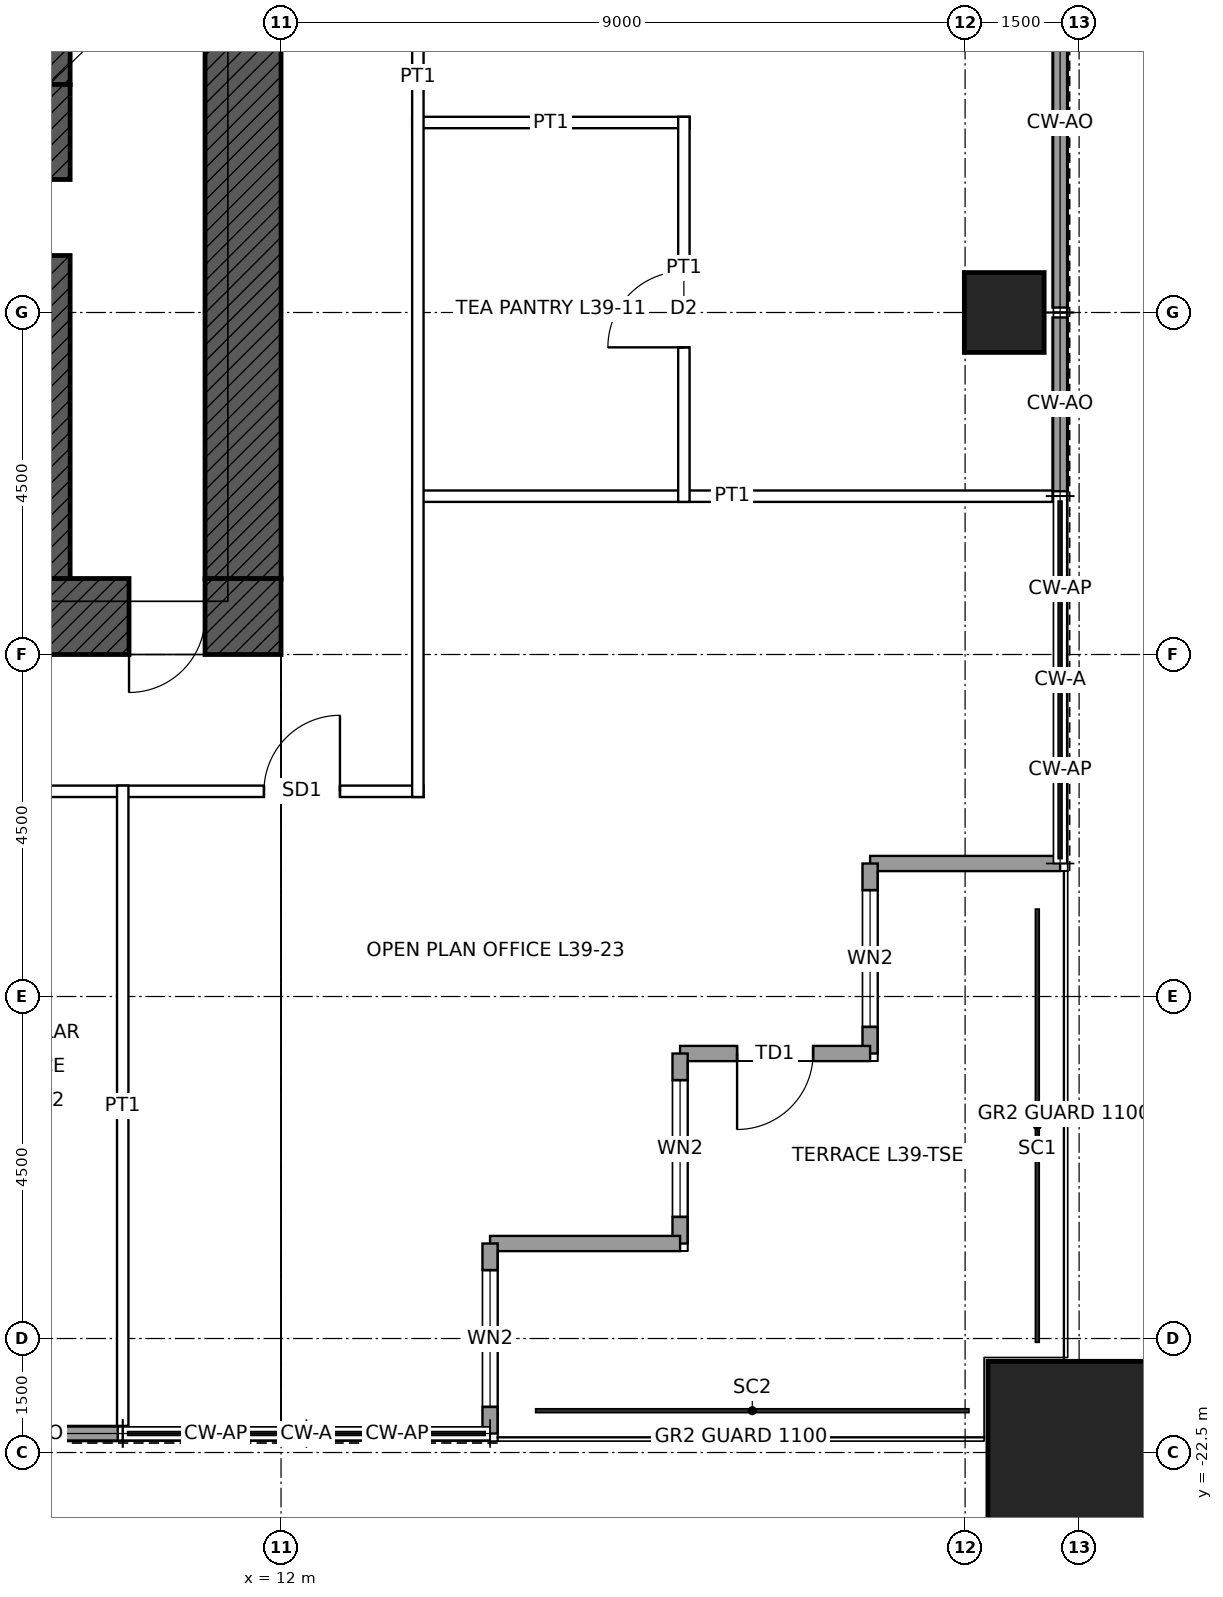
"""IFC4 building model, lengths in metres.
Left out: names, types, materials, properties, quantities, classifications, styles, units other than length and angle.
Written with IfcOpenShell. Run it as: python <this file> out.ifc"""

import sys

from ifc_helpers import new_model, si_unit, direction, frame, frame_2d, origin, origin_2d, place, context, subcontext, project, spatial, rectangle, hollow_rectangle, extrude, element, fill, save


model = new_model("IFC4")
c1 = context("Model", 3, precision=1e-05, world=origin(), true_north=direction((0.0, 1.0)))
c2 = subcontext(c1, "Body", "Model", "MODEL_VIEW")
j1 = project(units=[si_unit("LENGTHUNIT", "METRE"), si_unit("PLANEANGLEUNIT", "RADIAN")], contexts=[c1])
p1 = place(None, origin())
s1 = spatial("IfcSite", under=j1, at=p1, CompositionType="ELEMENT")
p2 = place(p1, origin())
s2 = spatial("IfcBuilding", under=s1, at=p2, CompositionType="ELEMENT")
p3 = place(p2, frame((0.0, 0.0, 189.9)))
s3 = spatial("IfcBuildingStorey", under=s2, at=p3, CompositionType="ELEMENT", Elevation=189.9)
p4 = place(p3, frame((22.5, -22.5, 0.0), z_axis=(0.0, 0.0, 1.0), x_axis=(1.0, 0.0, 0.0)))
e1 = element("IfcColumn", 1, at=p4, inside=s3, PredefinedType="COLUMN", context=c2, shape_type="SweptSolid", body=[
    extrude(hollow_rectangle(XDim=2.4, YDim=2.4, WallThickness=0.12, at=origin_2d()), origin(), (0.0, 0.0, 1.0), 4.0),
])
p5 = place(p3, frame((21.515, -7.5, 0.0), z_axis=(0.0, 0.0, 1.0), x_axis=(1.0, 0.0, 0.0)))
e2 = element("IfcColumn", 2, at=p5, inside=s3, PredefinedType="COLUMN", context=c2, shape_type="SweptSolid", body=[
    extrude(hollow_rectangle(XDim=1.05, YDim=1.05, WallThickness=0.07, at=origin_2d()), origin(), (0.0, 0.0, 1.0), 4.0),
])
p6 = place(p3, frame((12.0, -11.5, 0.0), z_axis=(0.0, 0.0, 1.0), x_axis=(-1.0, 0.0, 0.0)))
e3 = element("IfcWall", 3, at=p6, inside=s3, PredefinedType="SHEAR", context=c2, shape_type="SweptSolid", body=[
    extrude(rectangle(XDim=24.0, YDim=1.0, at=frame_2d((12.0, 0.0))), origin(), (0.0, 0.0, 1.0), 4.0),
])
p7 = place(p6, frame((11.5, 0.0, 0.0)))
e4 = element("IfcOpeningElement", 4, at=p7, cuts=e3, PredefinedType="OPENING", context=c2, shape_type="SweptSolid", body=[
    extrude(rectangle(XDim=1.0, YDim=2.1, at=frame_2d((0.5, 1.05))), frame((0.0, 0.51, 0.0), z_axis=(0.0, -1.0, 0.0), x_axis=(1.0, 0.0, 0.0)), (0.0, 0.0, 1.0), 1.02),
])
p8 = place(p6, frame((1.0, 0.0, 0.0)))
e5 = element("IfcOpeningElement", 5, at=p8, cuts=e3, PredefinedType="OPENING", context=c2, shape_type="SweptSolid", body=[
    extrude(rectangle(XDim=1.0, YDim=2.4, at=frame_2d((0.5, 1.2))), frame((0.0, 0.51, 0.0), z_axis=(0.0, -1.0, 0.0), x_axis=(1.0, 0.0, 0.0)), (0.0, 0.0, 1.0), 1.02),
])
p9 = place(p3, frame((11.5, 11.0, 0.0), z_axis=(0.0, 0.0, 1.0), x_axis=(0.0, -1.0, 0.0)))
e6 = element("IfcWall", 6, at=p9, inside=s3, PredefinedType="SHEAR", context=c2, shape_type="SweptSolid", body=[
    extrude(rectangle(XDim=22.0, YDim=1.0, at=frame_2d((11.0, 0.0))), origin(), (0.0, 0.0, 1.0), 4.0),
])
p10 = place(p9, frame((10.5, 0.0, 0.0)))
e7 = element("IfcOpeningElement", 7, at=p10, cuts=e6, PredefinedType="OPENING", context=c2, shape_type="SweptSolid", body=[
    extrude(rectangle(XDim=1.0, YDim=2.4, at=frame_2d((0.5, 1.2))), frame((0.0, 0.51, 0.0), z_axis=(0.0, -1.0, 0.0), x_axis=(1.0, 0.0, 0.0)), (0.0, 0.0, 1.0), 1.02),
])
p11 = place(p3, frame((-9.0, -4.5, 0.0), z_axis=(0.0, 0.0, 1.0), x_axis=(1.0, 0.0, 0.0)))
e8 = element("IfcWall", 8, at=p11, inside=s3, PredefinedType="SHEAR", context=c2, shape_type="SweptSolid", body=[
    extrude(rectangle(XDim=18.0, YDim=0.45, at=frame_2d((9.0, 0.0))), origin(), (0.0, 0.0, 1.0), 4.0),
])
p12 = place(p3, frame((9.0, -4.5, 0.0), z_axis=(0.0, 0.0, 1.0), x_axis=(0.0, 1.0, 0.0)))
e9 = element("IfcWall", 9, at=p12, inside=s3, PredefinedType="SHEAR", context=c2, shape_type="SweptSolid", body=[
    extrude(rectangle(XDim=3.0, YDim=0.45, at=frame_2d((1.5, 0.0))), origin(), (0.0, 0.0, 1.0), 4.0),
])
p13 = place(p3, frame((9.0, -11.0, 0.0), z_axis=(0.0, 0.0, 1.0), x_axis=(0.0, 1.0, 0.0)))
e10 = element("IfcWall", 10, at=p13, inside=s3, PredefinedType="SHEAR", context=c2, shape_type="SweptSolid", body=[
    extrude(rectangle(XDim=6.5, YDim=0.45, at=frame_2d((3.25, 0.0))), origin(), (0.0, 0.0, 1.0), 4.0),
])
p14 = place(p13, frame((4.25, 0.0, 0.0)))
e11 = element("IfcOpeningElement", 11, at=p14, cuts=e10, PredefinedType="OPENING", context=c2, shape_type="SweptSolid", body=[
    extrude(rectangle(XDim=1.0, YDim=2.1, at=frame_2d((0.5, 1.05))), frame((0.0, 0.235, 0.0), z_axis=(0.0, -1.0, 0.0), x_axis=(1.0, 0.0, 0.0)), (0.0, 0.0, 1.0), 0.47),
])
p15 = place(p3, frame((22.25, -14.75, 0.0), z_axis=(0.0, 0.0, 1.0), x_axis=(-1.0, 0.0, 0.0)))
e12 = element("IfcWall", 12, at=p15, inside=s3, PredefinedType="SOLIDWALL", context=c2, shape_type="SweptSolid", body=[
    extrude(rectangle(XDim=2.5, YDim=0.2, at=frame_2d((1.25, 0.0))), origin(), (0.0, 0.0, 1.0), 3.85),
])
p16 = place(p3, frame((19.75, -14.75, 0.0), z_axis=(0.0, 0.0, 1.0), x_axis=(0.0, -1.0, 0.0)))
e13 = element("IfcWall", 13, at=p16, inside=s3, PredefinedType="SOLIDWALL", context=c2, shape_type="SweptSolid", body=[
    extrude(rectangle(XDim=2.5, YDim=0.2, at=frame_2d((1.25, 0.0))), origin(), (0.0, 0.0, 1.0), 3.85),
])
p17 = place(p16, frame((0.35, 0.0, 0.3)))
e14 = element("IfcOpeningElement", 14, at=p17, cuts=e13, PredefinedType="OPENING", context=c2, shape_type="SweptSolid", body=[
    extrude(rectangle(XDim=1.8, YDim=2.4, at=frame_2d((0.9, 1.2))), frame((0.0, 0.11, 0.0), z_axis=(0.0, -1.0, 0.0), x_axis=(1.0, 0.0, 0.0)), (0.0, 0.0, 1.0), 0.22),
])
p18 = place(p3, frame((19.75, -17.25, 0.0), z_axis=(0.0, 0.0, 1.0), x_axis=(-1.0, 0.0, 0.0)))
e15 = element("IfcWall", 15, at=p18, inside=s3, PredefinedType="SOLIDWALL", context=c2, shape_type="SweptSolid", body=[
    extrude(rectangle(XDim=2.5, YDim=0.2, at=frame_2d((1.25, 0.0))), origin(), (0.0, 0.0, 1.0), 3.85),
])
p19 = place(p18, frame((0.75, 0.0, 0.0)))
e16 = element("IfcOpeningElement", 16, at=p19, cuts=e15, PredefinedType="OPENING", context=c2, shape_type="SweptSolid", body=[
    extrude(rectangle(XDim=1.0, YDim=2.4, at=frame_2d((0.5, 1.2))), frame((0.0, 0.11, 0.0), z_axis=(0.0, -1.0, 0.0), x_axis=(1.0, 0.0, 0.0)), (0.0, 0.0, 1.0), 0.22),
])
p20 = place(p3, frame((17.25, -17.25, 0.0), z_axis=(0.0, 0.0, 1.0), x_axis=(0.0, -1.0, 0.0)))
e17 = element("IfcWall", 17, at=p20, inside=s3, PredefinedType="SOLIDWALL", context=c2, shape_type="SweptSolid", body=[
    extrude(rectangle(XDim=2.5, YDim=0.2, at=frame_2d((1.25, 0.0))), origin(), (0.0, 0.0, 1.0), 3.85),
])
p21 = place(p20, frame((0.35, 0.0, 0.3)))
e18 = element("IfcOpeningElement", 18, at=p21, cuts=e17, PredefinedType="OPENING", context=c2, shape_type="SweptSolid", body=[
    extrude(rectangle(XDim=1.8, YDim=2.4, at=frame_2d((0.9, 1.2))), frame((0.0, 0.11, 0.0), z_axis=(0.0, -1.0, 0.0), x_axis=(1.0, 0.0, 0.0)), (0.0, 0.0, 1.0), 0.22),
])
p22 = place(p3, frame((17.25, -19.75, 0.0), z_axis=(0.0, 0.0, 1.0), x_axis=(-1.0, 0.0, 0.0)))
e19 = element("IfcWall", 19, at=p22, inside=s3, PredefinedType="SOLIDWALL", context=c2, shape_type="SweptSolid", body=[
    extrude(rectangle(XDim=2.5, YDim=0.2, at=frame_2d((1.25, 0.0))), origin(), (0.0, 0.0, 1.0), 3.85),
])
p23 = place(p3, frame((14.75, -19.75, 0.0), z_axis=(0.0, 0.0, 1.0), x_axis=(0.0, -1.0, 0.0)))
e20 = element("IfcWall", 20, at=p23, inside=s3, PredefinedType="SOLIDWALL", context=c2, shape_type="SweptSolid", body=[
    extrude(rectangle(XDim=2.5, YDim=0.2, at=frame_2d((1.25, 0.0))), origin(), (0.0, 0.0, 1.0), 3.85),
])
p24 = place(p23, frame((0.35, 0.0, 0.3)))
e21 = element("IfcOpeningElement", 21, at=p24, cuts=e20, PredefinedType="OPENING", context=c2, shape_type="SweptSolid", body=[
    extrude(rectangle(XDim=1.8, YDim=2.4, at=frame_2d((0.9, 1.2))), frame((0.0, 0.11, 0.0), z_axis=(0.0, -1.0, 0.0), x_axis=(1.0, 0.0, 0.0)), (0.0, 0.0, 1.0), 0.22),
])
for number, where, z_axis, x_axis in (
    (22, (22.25, -2.565, 0.0), (0.0, 0.0, 1.0), (0.0, -1.0, 0.0)),
    (23, (22.25, -5.032, 0.0), (0.0, 0.0, 1.0), (0.0, -1.0, 0.0)),
):
    element("IfcWall", number, at=place(p3, frame(where, z_axis=z_axis, x_axis=x_axis)), inside=s3, PredefinedType="SOLIDWALL", context=c2, shape_type="SweptSolid", body=[
        extrude(rectangle(XDim=2.403, YDim=0.2, at=frame_2d((1.201, 0.0))), origin(), (0.0, 0.0, 1.0), 3.85),
    ])
for number, where, z_axis, x_axis in (
    (24, (22.25, -7.565, 0.0), (0.0, 0.0, 1.0), (0.0, -1.0, 0.0)),
    (25, (9.852, -22.25, 0.0), (0.0, 0.0, 1.0), (-1.0, 0.0, 0.0)),
):
    element("IfcWall", number, at=place(p3, frame(where, z_axis=z_axis, x_axis=x_axis)), inside=s3, PredefinedType="SOLIDWALL", context=c2, shape_type="SweptSolid", body=[
        extrude(rectangle(XDim=2.287, YDim=0.2, at=frame_2d((1.144, 0.0))), origin(), (0.0, 0.0, 1.0), 3.85),
    ])
p25 = place(p3, frame((-13.875, -13.8, 0.0), z_axis=(0.0, 0.0, 1.0), x_axis=(1.0, 0.0, 0.0)))
e26 = element("IfcWall", 26, at=p25, inside=s3, PredefinedType="PARTITIONING", context=c2, shape_type="SweptSolid", body=[
    extrude(rectangle(XDim=27.75, YDim=0.15, at=frame_2d((13.875, 0.0))), origin(), (0.0, 0.0, 1.0), 3.85),
])
p26 = place(p25, frame((18.375, 0.0, 0.0)))
e27 = element("IfcOpeningElement", 27, at=p26, cuts=e26, PredefinedType="OPENING", context=c2, shape_type="SweptSolid", body=[
    extrude(rectangle(XDim=1.0, YDim=2.4, at=frame_2d((0.5, 1.2))), frame((0.0, 0.085, 0.0), z_axis=(0.0, -1.0, 0.0), x_axis=(1.0, 0.0, 0.0)), (0.0, 0.0, 1.0), 0.17),
])
p27 = place(p25, frame((14.975, 0.0, 0.0)))
e28 = element("IfcOpeningElement", 28, at=p27, cuts=e26, PredefinedType="OPENING", context=c2, shape_type="SweptSolid", body=[
    extrude(rectangle(XDim=1.0, YDim=2.1, at=frame_2d((0.5, 1.05))), frame((0.0, 0.085, 0.0), z_axis=(0.0, -1.0, 0.0), x_axis=(1.0, 0.0, 0.0)), (0.0, 0.0, 1.0), 0.17),
])
p28 = place(p25, frame((11.775, 0.0, 0.0)))
e29 = element("IfcOpeningElement", 29, at=p28, cuts=e26, PredefinedType="OPENING", context=c2, shape_type="SweptSolid", body=[
    extrude(rectangle(XDim=1.0, YDim=2.1, at=frame_2d((0.5, 1.05))), frame((0.0, 0.085, 0.0), z_axis=(0.0, -1.0, 0.0), x_axis=(1.0, 0.0, 0.0)), (0.0, 0.0, 1.0), 0.17),
])
p29 = place(p25, frame((8.375, 0.0, 0.0)))
e30 = element("IfcOpeningElement", 30, at=p29, cuts=e26, PredefinedType="OPENING", context=c2, shape_type="SweptSolid", body=[
    extrude(rectangle(XDim=1.0, YDim=2.4, at=frame_2d((0.5, 1.2))), frame((0.0, 0.085, 0.0), z_axis=(0.0, -1.0, 0.0), x_axis=(1.0, 0.0, 0.0)), (0.0, 0.0, 1.0), 0.17),
])
p30 = place(p25, frame((25.65, 0.0, 0.0)))
e31 = element("IfcOpeningElement", 31, at=p30, cuts=e26, PredefinedType="OPENING", context=c2, shape_type="SweptSolid", body=[
    extrude(rectangle(XDim=1.0, YDim=2.4, at=frame_2d((0.5, 1.2))), frame((0.0, 0.085, 0.0), z_axis=(0.0, -1.0, 0.0), x_axis=(1.0, 0.0, 0.0)), (0.0, 0.0, 1.0), 0.17),
])
p31 = place(p25, frame((1.517, 0.0, 0.0)))
e32 = element("IfcOpeningElement", 32, at=p31, cuts=e26, PredefinedType="OPENING", context=c2, shape_type="SweptSolid", body=[
    extrude(rectangle(XDim=1.0, YDim=2.4, at=frame_2d((0.5, 1.2))), frame((0.0, 0.085, 0.0), z_axis=(0.0, -1.0, 0.0), x_axis=(1.0, 0.0, 0.0)), (0.0, 0.0, 1.0), 0.17),
])
p32 = place(p3, frame((13.725, -9.917, 0.0), z_axis=(0.0, 0.0, 1.0), x_axis=(1.0, 0.0, 0.0)))
e33 = element("IfcWall", 33, at=p32, inside=s3, PredefinedType="PARTITIONING", context=c2, shape_type="SweptSolid", body=[
    extrude(rectangle(XDim=8.425, YDim=0.15, at=frame_2d((4.212, 0.0))), origin(), (0.0, 0.0, 1.0), 3.85),
])
p33 = place(p3, frame((13.725, -5.0, 0.0), z_axis=(0.0, 0.0, 1.0), x_axis=(1.0, 0.0, 0.0)))
e34 = element("IfcWall", 34, at=p33, inside=s3, PredefinedType="PARTITIONING", context=c2, shape_type="SweptSolid", body=[
    extrude(rectangle(XDim=3.65, YDim=0.15, at=frame_2d((1.825, 0.0))), origin(), (0.0, 0.0, 1.0), 3.85),
])
p34 = place(p3, frame((9.917, -22.15, 0.0), z_axis=(0.0, 0.0, 1.0), x_axis=(0.0, 1.0, 0.0)))
e35 = element("IfcWall", 35, at=p34, inside=s3, PredefinedType="PARTITIONING", context=c2, shape_type="SweptSolid", body=[
    extrude(rectangle(XDim=8.425, YDim=0.15, at=frame_2d((4.212, 0.0))), origin(), (0.0, 0.0, 1.0), 3.85),
])
p35 = place(p3, frame((13.8, -13.875, 0.0), z_axis=(0.0, 0.0, 1.0), x_axis=(0.0, 1.0, 0.0)))
e36 = element("IfcWall", 36, at=p35, inside=s3, PredefinedType="PARTITIONING", context=c2, shape_type="SweptSolid", body=[
    extrude(rectangle(XDim=18.95, YDim=0.15, at=frame_2d((9.475, 0.0))), origin(), (0.0, 0.0, 1.0), 3.85),
])
p36 = place(p35, frame((15.875, 0.0, 0.0)))
e37 = element("IfcOpeningElement", 37, at=p36, cuts=e36, PredefinedType="OPENING", context=c2, shape_type="SweptSolid", body=[
    extrude(rectangle(XDim=1.0, YDim=2.4, at=frame_2d((0.5, 1.2))), frame((0.0, 0.085, 0.0), z_axis=(0.0, -1.0, 0.0), x_axis=(1.0, 0.0, 0.0)), (0.0, 0.0, 1.0), 0.17),
])
p37 = place(p35, frame((10.875, 0.0, 0.0)))
e38 = element("IfcOpeningElement", 38, at=p37, cuts=e36, PredefinedType="OPENING", context=c2, shape_type="SweptSolid", body=[
    extrude(rectangle(XDim=1.0, YDim=2.4, at=frame_2d((0.5, 1.2))), frame((0.0, 0.085, 0.0), z_axis=(0.0, -1.0, 0.0), x_axis=(1.0, 0.0, 0.0)), (0.0, 0.0, 1.0), 0.17),
])
p38 = place(p3, frame((17.3, -9.992, 0.0), z_axis=(0.0, 0.0, 1.0), x_axis=(0.0, 1.0, 0.0)))
e39 = element("IfcWall", 39, at=p38, inside=s3, PredefinedType="PARTITIONING", context=c2, shape_type="SweptSolid", body=[
    extrude(rectangle(XDim=5.067, YDim=0.15, at=frame_2d((2.533, 0.0))), origin(), (0.0, 0.0, 1.0), 3.85),
])
p39 = place(p38, frame((2.033, 0.0, 0.0)))
e40 = element("IfcOpeningElement", 40, at=p39, cuts=e39, PredefinedType="OPENING", context=c2, shape_type="SweptSolid", body=[
    extrude(rectangle(XDim=1.0, YDim=2.1, at=frame_2d((0.5, 1.05))), frame((0.0, 0.085, 0.0), z_axis=(0.0, -1.0, 0.0), x_axis=(1.0, 0.0, 0.0)), (0.0, 0.0, 1.0), 0.17),
])
p40 = place(p17, origin())
e41 = element("IfcWindow", 41, at=p40, inside=s3, PartitioningType="SINGLE_PANEL", PredefinedType="WINDOW", context=c2, shape_type="SweptSolid", body=[
    extrude(rectangle(XDim=1.8, YDim=2.4, at=frame_2d((0.9, 1.2))), frame((0.0, 0.03, 0.0), z_axis=(0.0, -1.0, 0.0), x_axis=(1.0, 0.0, 0.0)), (0.0, 0.0, 1.0), 0.06),
])
fill(e14, e41)
p41 = place(p19, origin())
e42 = element("IfcDoor", 42, at=p41, inside=s3, OperationType="SINGLE_SWING_RIGHT", PredefinedType="DOOR", context=c2, shape_type="SweptSolid", body=[
    extrude(rectangle(XDim=1.0, YDim=2.4, at=frame_2d((0.5, 1.2))), frame((0.0, 0.025, 0.0), z_axis=(0.0, -1.0, 0.0), x_axis=(1.0, 0.0, 0.0)), (0.0, 0.0, 1.0), 0.05),
])
fill(e16, e42)
p42 = place(p21, origin())
e43 = element("IfcWindow", 43, at=p42, inside=s3, PartitioningType="SINGLE_PANEL", PredefinedType="WINDOW", context=c2, shape_type="SweptSolid", body=[
    extrude(rectangle(XDim=1.8, YDim=2.4, at=frame_2d((0.9, 1.2))), frame((0.0, 0.03, 0.0), z_axis=(0.0, -1.0, 0.0), x_axis=(1.0, 0.0, 0.0)), (0.0, 0.0, 1.0), 0.06),
])
fill(e18, e43)
p43 = place(p24, origin())
e44 = element("IfcWindow", 44, at=p43, inside=s3, PartitioningType="SINGLE_PANEL", PredefinedType="WINDOW", context=c2, shape_type="SweptSolid", body=[
    extrude(rectangle(XDim=1.8, YDim=2.4, at=frame_2d((0.9, 1.2))), frame((0.0, 0.03, 0.0), z_axis=(0.0, -1.0, 0.0), x_axis=(1.0, 0.0, 0.0)), (0.0, 0.0, 1.0), 0.06),
])
fill(e21, e44)
p44 = place(p8, origin())
e45 = element("IfcDoor", 45, at=p44, inside=s3, OperationType="SINGLE_SWING_RIGHT", PredefinedType="DOOR", context=c2, shape_type="SweptSolid", body=[
    extrude(rectangle(XDim=1.0, YDim=2.4, at=frame_2d((0.5, 1.2))), frame((0.0, 0.485, 0.0), z_axis=(0.0, -1.0, 0.0), x_axis=(1.0, 0.0, 0.0)), (0.0, 0.0, 1.0), 0.05),
])
fill(e5, e45)
p45 = place(p14, origin())
e46 = element("IfcDoor", 46, at=p45, inside=s3, OperationType="SINGLE_SWING_LEFT", PredefinedType="DOOR", context=c2, shape_type="SweptSolid", body=[
    extrude(rectangle(XDim=1.0, YDim=2.1, at=frame_2d((0.5, 1.05))), frame((0.0, 0.025, 0.0), z_axis=(0.0, -1.0, 0.0), x_axis=(1.0, 0.0, 0.0)), (0.0, 0.0, 1.0), 0.05),
])
fill(e11, e46)
p46 = place(p39, origin())
e47 = element("IfcDoor", 47, at=p46, inside=s3, OperationType="SINGLE_SWING_LEFT", PredefinedType="DOOR", context=c2, shape_type="SweptSolid", body=[
    extrude(rectangle(XDim=1.0, YDim=2.1, at=frame_2d((0.5, 1.05))), frame((0.0, 0.025, 0.0), z_axis=(0.0, -1.0, 0.0), x_axis=(1.0, 0.0, 0.0)), (0.0, 0.0, 1.0), 0.05),
])
fill(e40, e47)
p47 = place(p30, origin())
e48 = element("IfcDoor", 48, at=p47, inside=s3, OperationType="SINGLE_SWING_RIGHT", PredefinedType="DOOR", context=c2, shape_type="SweptSolid", body=[
    extrude(rectangle(XDim=1.0, YDim=2.4, at=frame_2d((0.5, 1.2))), frame((0.0, 0.025, 0.0), z_axis=(0.0, -1.0, 0.0), x_axis=(1.0, 0.0, 0.0)), (0.0, 0.0, 1.0), 0.05),
])
fill(e31, e48)
save(model, sys.argv[1])
